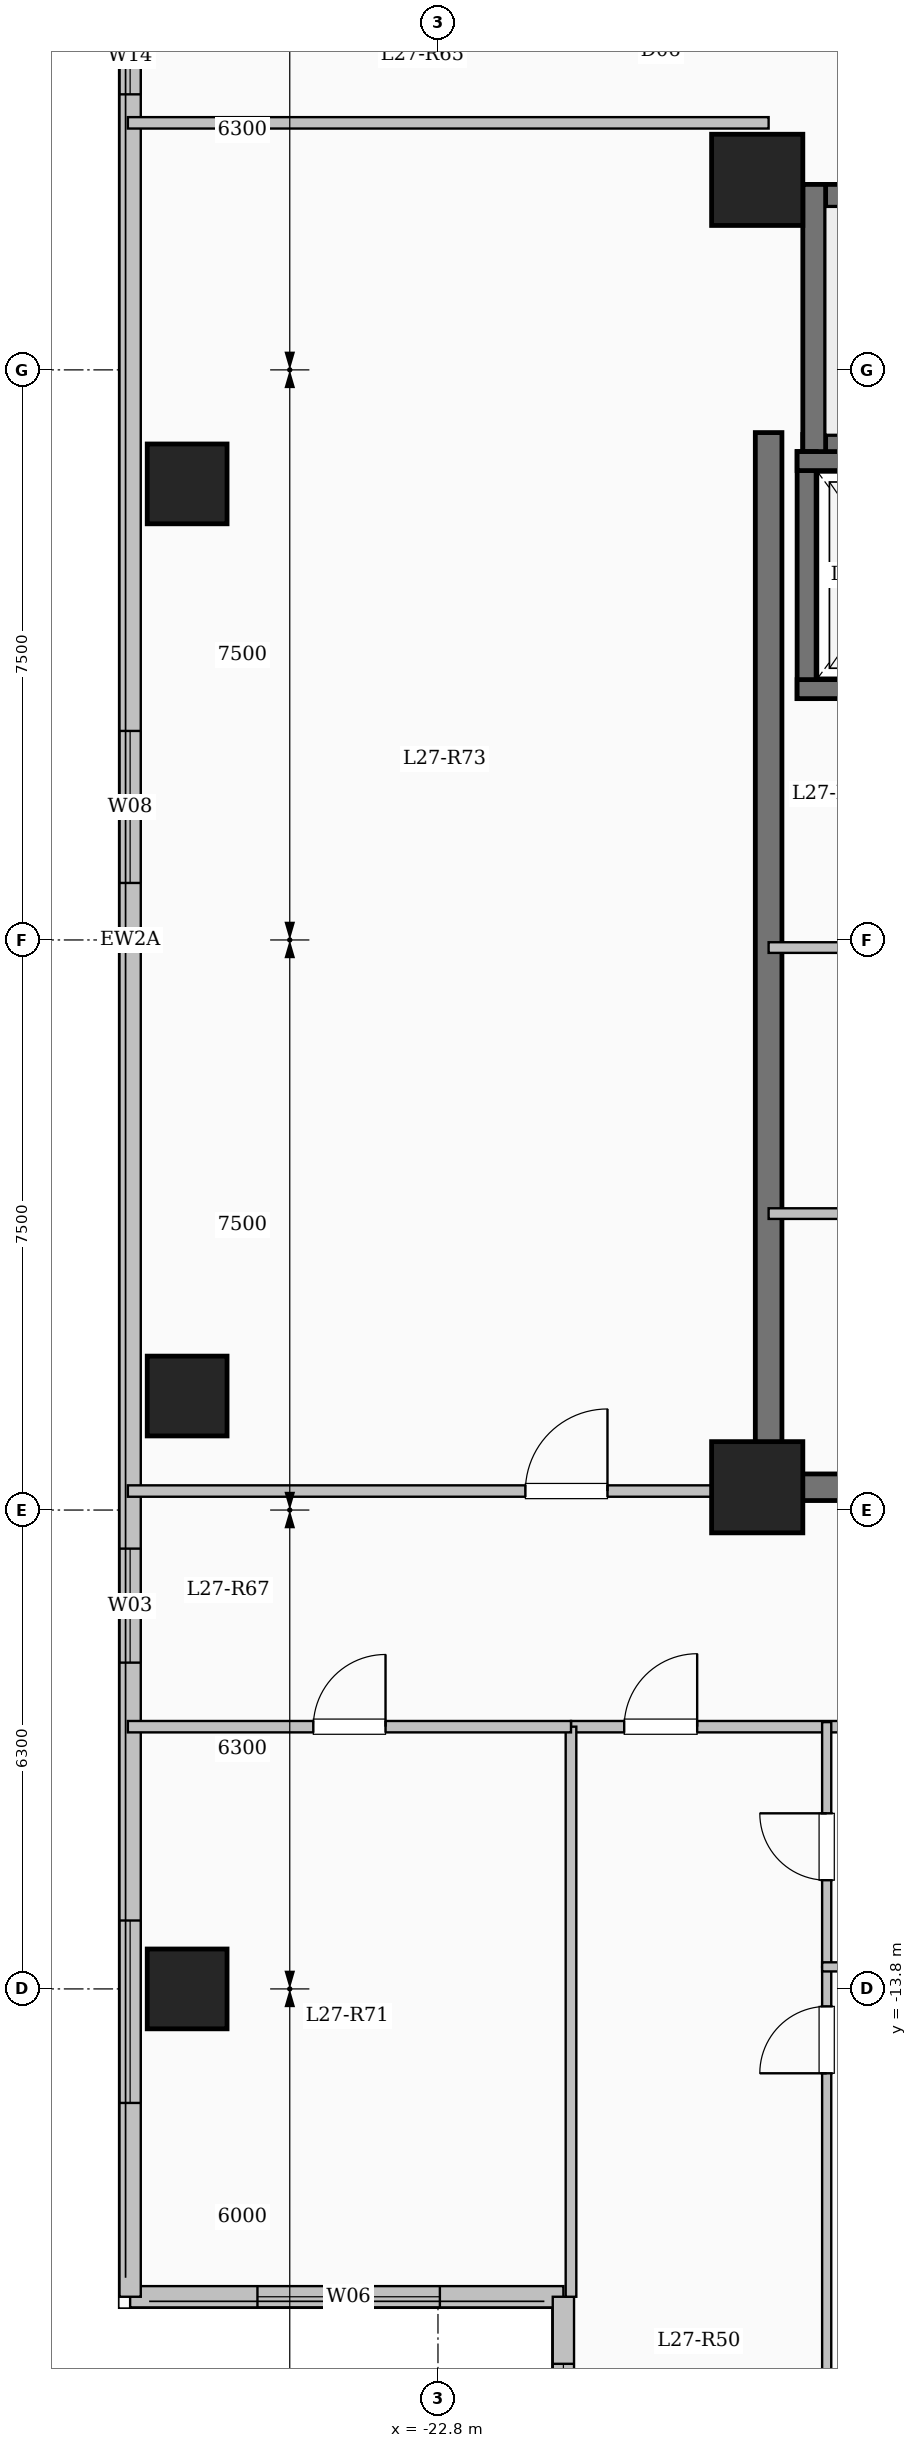
"""IFC4 building model, lengths in metres.
Left out: names, types, materials, properties, quantities, classifications, styles, units other than length and angle.
Written with IfcOpenShell. Run it as: python <this file> out.ifc"""

import sys

from ifc_helpers import new_model, si_unit, direction, frame, frame_2d, origin, origin_2d, place, context, subcontext, project, spatial, rectangle, extrude, element, fill, save


model = new_model("IFC4")
c1 = context("Model", 3, precision=1e-05, world=origin(), true_north=direction((0.0, 1.0)))
c2 = subcontext(c1, "Body", "Model", "MODEL_VIEW")
j1 = project(units=[si_unit("LENGTHUNIT", "METRE"), si_unit("PLANEANGLEUNIT", "RADIAN")], contexts=[c1])
p1 = place(None, origin())
s1 = spatial("IfcSite", under=j1, at=p1, CompositionType="ELEMENT")
p2 = place(p1, origin())
s2 = spatial("IfcBuilding", under=s1, at=p2, CompositionType="ELEMENT")
p3 = place(p2, frame((0.0, 0.0, 101.75)))
s3 = spatial("IfcBuildingStorey", under=s2, at=p3, CompositionType="ELEMENT", Elevation=101.75)
for number, where, z_axis, x_axis in (
    (1, (-18.6, -7.2, 0.0), (0.0, 0.0, 1.0), (1.0, 0.0, 0.0)),
    (2, (-18.6, 10.0, 0.0), (0.0, 0.0, 1.0), (1.0, 0.0, 0.0)),
):
    element("IfcColumn", number, at=place(p3, frame(where, z_axis=z_axis, x_axis=x_axis)), inside=s3, PredefinedType="COLUMN", context=c2, shape_type="SweptSolid", body=[
        extrude(rectangle(XDim=1.2, YDim=1.2, at=origin_2d()), origin(), (0.0, 0.0, 1.0), 3.35),
    ])
for number, where, z_axis, x_axis in (
    (3, (-26.1, -13.8, 0.0), (0.0, 0.0, 1.0), (1.0, 0.0, 0.0)),
    (4, (-26.1, -6.0, 0.0), (0.0, 0.0, 1.0), (1.0, 0.0, 0.0)),
    (5, (-26.1, 6.0, 0.0), (0.0, 0.0, 1.0), (1.0, 0.0, 0.0)),
):
    element("IfcColumn", number, at=place(p3, frame(where, z_axis=z_axis, x_axis=x_axis)), inside=s3, PredefinedType="COLUMN", context=c2, shape_type="SweptSolid", body=[
        extrude(rectangle(XDim=1.05, YDim=1.05, at=origin_2d()), origin(), (0.0, 0.0, 1.0), 3.35),
    ])
p4 = place(p3, frame((-21.15, -17.85, 0.0), z_axis=(0.0, 0.0, 1.0), x_axis=(-1.0, 0.0, 0.0)))
e6 = element("IfcWall", 6, at=p4, inside=s3, PredefinedType="SOLIDWALL", context=c2, shape_type="SweptSolid", body=[
    extrude(rectangle(XDim=5.7, YDim=0.28, at=frame_2d((2.85, 0.0))), origin(), (0.0, 0.0, 1.0), 3.1),
])
p5 = place(p4, frame((1.625, 0.0, 0.9)))
e7 = element("IfcOpeningElement", 7, at=p5, cuts=e6, PredefinedType="OPENING", context=c2, shape_type="SweptSolid", body=[
    extrude(rectangle(XDim=2.4, YDim=1.8, at=frame_2d((1.2, 0.9))), frame((0.0, 0.15, 0.0), z_axis=(0.0, -1.0, 0.0), x_axis=(1.0, 0.0, 0.0)), (0.0, 0.0, 1.0), 0.3),
])
p6 = place(p3, frame((-26.85, -17.85, 0.0), z_axis=(0.0, 0.0, 1.0), x_axis=(0.0, 1.0, 0.0)))
e8 = element("IfcWall", 8, at=p6, inside=s3, PredefinedType="SOLIDWALL", context=c2, shape_type="SweptSolid", body=[
    extrude(rectangle(XDim=35.7, YDim=0.28, at=frame_2d((17.85, 0.0))), origin(), (0.0, 0.0, 1.0), 3.1),
])
p7 = place(p6, frame((2.55, 0.0, 0.9)))
e9 = element("IfcOpeningElement", 9, at=p7, cuts=e8, PredefinedType="OPENING", context=c2, shape_type="SweptSolid", body=[
    extrude(rectangle(XDim=2.4, YDim=1.8, at=frame_2d((1.2, 0.9))), frame((0.0, 0.15, 0.0), z_axis=(0.0, -1.0, 0.0), x_axis=(1.0, 0.0, 0.0)), (0.0, 0.0, 1.0), 0.3),
])
p8 = place(p6, frame((8.343, 0.0, 0.9)))
e10 = element("IfcOpeningElement", 10, at=p8, cuts=e8, PredefinedType="OPENING", context=c2, shape_type="SweptSolid", body=[
    extrude(rectangle(XDim=1.5, YDim=1.65, at=frame_2d((0.75, 0.825))), frame((0.0, 0.15, 0.0), z_axis=(0.0, -1.0, 0.0), x_axis=(1.0, 0.0, 0.0)), (0.0, 0.0, 1.0), 0.3),
])
p9 = place(p6, frame((18.6, 0.0, 0.9)))
e11 = element("IfcOpeningElement", 11, at=p9, cuts=e8, PredefinedType="OPENING", context=c2, shape_type="SweptSolid", body=[
    extrude(rectangle(XDim=2.0, YDim=1.7, at=frame_2d((1.0, 0.85))), frame((0.0, 0.15, 0.0), z_axis=(0.0, -1.0, 0.0), x_axis=(1.0, 0.0, 0.0)), (0.0, 0.0, 1.0), 0.3),
])
p10 = place(p6, frame((28.975, 0.0, 0.95)))
e12 = element("IfcOpeningElement", 12, at=p10, cuts=e8, PredefinedType="OPENING", context=c2, shape_type="SweptSolid", body=[
    extrude(rectangle(XDim=1.0, YDim=1.5, at=frame_2d((0.5, 0.75))), frame((0.0, 0.15, 0.0), z_axis=(0.0, -1.0, 0.0), x_axis=(1.0, 0.0, 0.0)), (0.0, 0.0, 1.0), 0.3),
])
p11 = place(p6, frame((32.025, 0.0, 0.9)))
e13 = element("IfcOpeningElement", 13, at=p11, cuts=e8, PredefinedType="OPENING", context=c2, shape_type="SweptSolid", body=[
    extrude(rectangle(XDim=2.0, YDim=1.7, at=frame_2d((1.0, 0.85))), frame((0.0, 0.15, 0.0), z_axis=(0.0, -1.0, 0.0), x_axis=(1.0, 0.0, 0.0)), (0.0, 0.0, 1.0), 0.3),
])
p12 = place(p3, frame((-21.15, -22.05, 0.0), z_axis=(0.0, 0.0, 1.0), x_axis=(0.0, 1.0, 0.0)))
e14 = element("IfcWall", 14, at=p12, inside=s3, PredefinedType="SOLIDWALL", context=c2, shape_type="SweptSolid", body=[
    extrude(rectangle(XDim=4.2, YDim=0.28, at=frame_2d((2.1, 0.0))), origin(), (0.0, 0.0, 1.0), 3.1),
])
p13 = place(p12, frame((0.918, 0.0, 0.9)))
e15 = element("IfcOpeningElement", 15, at=p13, cuts=e14, PredefinedType="OPENING", context=c2, shape_type="SweptSolid", body=[
    extrude(rectangle(XDim=2.4, YDim=1.8, at=frame_2d((1.2, 0.9))), frame((0.0, 0.15, 0.0), z_axis=(0.0, -1.0, 0.0), x_axis=(1.0, 0.0, 0.0)), (0.0, 0.0, 1.0), 0.3),
])
p14 = place(p3, frame((-18.0, 9.79, 0.0), z_axis=(0.0, 0.0, 1.0), x_axis=(1.0, 0.0, 0.0)))
e16 = element("IfcWall", 16, at=p14, inside=s3, PredefinedType="SHEAR", context=c2, shape_type="SweptSolid", body=[
    extrude(rectangle(XDim=8.0, YDim=0.3, at=frame_2d((4.0, 0.0))), origin(), (0.0, 0.0, 1.0), 3.35),
])
p15 = place(p3, frame((-18.0, 6.5, 0.0), z_axis=(0.0, 0.0, 1.0), x_axis=(1.0, 0.0, 0.0)))
e17 = element("IfcWall", 17, at=p15, inside=s3, PredefinedType="SHEAR", context=c2, shape_type="SweptSolid", body=[
    extrude(rectangle(XDim=8.0, YDim=0.3, at=frame_2d((4.0, 0.0))), origin(), (0.0, 0.0, 1.0), 3.35),
])
p16 = place(p15, frame((6.45, 0.0, 0.0)))
e18 = element("IfcOpeningElement", 18, at=p16, cuts=e17, PredefinedType="OPENING", context=c2, shape_type="SweptSolid", body=[
    extrude(rectangle(XDim=1.0, YDim=2.15, at=frame_2d((0.5, 1.075))), frame((0.0, 0.16, 0.0), z_axis=(0.0, -1.0, 0.0), x_axis=(1.0, 0.0, 0.0)), (0.0, 0.0, 1.0), 0.32),
])
p17 = place(p3, frame((-17.85, 6.35, 0.0), z_axis=(0.0, 0.0, 1.0), x_axis=(0.0, 1.0, 0.0)))
e19 = element("IfcWall", 19, at=p17, inside=s3, PredefinedType="SHEAR", context=c2, shape_type="SweptSolid", body=[
    extrude(rectangle(XDim=3.59, YDim=0.3, at=frame_2d((1.795, 0.0))), origin(), (0.0, 0.0, 1.0), 3.35),
])
p18 = place(p3, frame((-17.95, 3.175, 0.0), z_axis=(0.0, 0.0, 1.0), x_axis=(0.0, 1.0, 0.0)))
e20 = element("IfcWall", 20, at=p18, inside=s3, PredefinedType="SHEAR", context=c2, shape_type="SweptSolid", body=[
    extrude(rectangle(XDim=3.25, YDim=0.25, at=frame_2d((1.625, 0.0))), origin(), (0.0, 0.0, 1.0), 3.35),
])
for number, where, z_axis, x_axis in (
    (21, (-18.075, 3.3, 0.0), (0.0, 0.0, 1.0), (1.0, 0.0, 0.0)),
    (22, (-18.075, 6.3, 0.0), (0.0, 0.0, 1.0), (1.0, 0.0, 0.0)),
):
    element("IfcWall", number, at=place(p3, frame(where, z_axis=z_axis, x_axis=x_axis)), inside=s3, PredefinedType="SHEAR", context=c2, shape_type="SweptSolid", body=[
        extrude(rectangle(XDim=2.55, YDim=0.25, at=frame_2d((1.275, 0.0))), origin(), (0.0, 0.0, 1.0), 3.35),
    ])
p19 = place(p3, frame((-18.45, -7.375, 0.0), z_axis=(0.0, 0.0, 1.0), x_axis=(0.0, 1.0, 0.0)))
e23 = element("IfcWall", 23, at=p19, inside=s3, PredefinedType="SHEAR", context=c2, shape_type="SweptSolid", body=[
    extrude(rectangle(XDim=14.05, YDim=0.35, at=frame_2d((7.025, 0.0))), origin(), (0.0, 0.0, 1.0), 3.35),
])
p20 = place(p3, frame((-18.625, -7.2, 0.0), z_axis=(0.0, 0.0, 1.0), x_axis=(1.0, 0.0, 0.0)))
e24 = element("IfcWall", 24, at=p20, inside=s3, PredefinedType="SHEAR", context=c2, shape_type="SweptSolid", body=[
    extrude(rectangle(XDim=8.55, YDim=0.35, at=frame_2d((4.275, 0.0))), origin(), (0.0, 0.0, 1.0), 3.35),
])
p21 = place(p3, frame((-18.45, -3.6, 0.0), z_axis=(0.0, 0.0, 1.0), x_axis=(1.0, 0.0, 0.0)))
e25 = element("IfcWall", 25, at=p21, inside=s3, PredefinedType="PARTITIONING", context=c2, shape_type="SweptSolid", body=[
    extrude(rectangle(XDim=3.05, YDim=0.14, at=frame_2d((1.525, 0.0))), origin(), (0.0, 0.0, 1.0), 3.1),
])
p22 = place(p21, frame((1.05, 0.0, 0.0)))
e26 = element("IfcOpeningElement", 26, at=p22, cuts=e25, PredefinedType="OPENING", context=c2, shape_type="SweptSolid", body=[
    extrude(rectangle(XDim=0.9, YDim=2.08, at=frame_2d((0.45, 1.04))), frame((0.0, 0.08, 0.0), z_axis=(0.0, -1.0, 0.0), x_axis=(1.0, 0.0, 0.0)), (0.0, 0.0, 1.0), 0.16),
])
p23 = place(p3, frame((-18.45, -0.1, 0.0), z_axis=(0.0, 0.0, 1.0), x_axis=(1.0, 0.0, 0.0)))
e27 = element("IfcWall", 27, at=p23, inside=s3, PredefinedType="PARTITIONING", context=c2, shape_type="SweptSolid", body=[
    extrude(rectangle(XDim=3.05, YDim=0.14, at=frame_2d((1.525, 0.0))), origin(), (0.0, 0.0, 1.0), 3.1),
])
p24 = place(p23, frame((1.05, 0.0, 0.0)))
e28 = element("IfcOpeningElement", 28, at=p24, cuts=e27, PredefinedType="OPENING", context=c2, shape_type="SweptSolid", body=[
    extrude(rectangle(XDim=0.9, YDim=2.08, at=frame_2d((0.45, 1.04))), frame((0.0, 0.08, 0.0), z_axis=(0.0, -1.0, 0.0), x_axis=(1.0, 0.0, 0.0)), (0.0, 0.0, 1.0), 0.16),
])
p25 = place(p3, frame((-21.05, -10.35, 0.0), z_axis=(0.0, 0.0, 1.0), x_axis=(1.0, 0.0, 0.0)))
e29 = element("IfcWall", 29, at=p25, inside=s3, PredefinedType="PARTITIONING", context=c2, shape_type="SweptSolid", body=[
    extrude(rectangle(XDim=12.5, YDim=0.15, at=frame_2d((6.25, 0.0))), origin(), (0.0, 0.0, 1.0), 3.1),
])
p26 = place(p25, frame((0.7, 0.0, 0.0)))
e30 = element("IfcOpeningElement", 30, at=p26, cuts=e29, PredefinedType="OPENING", context=c2, shape_type="SweptSolid", body=[
    extrude(rectangle(XDim=0.96, YDim=2.15, at=frame_2d((0.48, 1.075))), frame((0.0, 0.085, 0.0), z_axis=(0.0, -1.0, 0.0), x_axis=(1.0, 0.0, 0.0)), (0.0, 0.0, 1.0), 0.17),
])
p27 = place(p25, frame((7.174, 0.0, 0.0)))
e31 = element("IfcOpeningElement", 31, at=p27, cuts=e29, PredefinedType="OPENING", context=c2, shape_type="SweptSolid", body=[
    extrude(rectangle(XDim=0.96, YDim=2.15, at=frame_2d((0.48, 1.075))), frame((0.0, 0.085, 0.0), z_axis=(0.0, -1.0, 0.0), x_axis=(1.0, 0.0, 0.0)), (0.0, 0.0, 1.0), 0.17),
])
p28 = place(p3, frame((-17.686, -22.1, 0.0), z_axis=(0.0, 0.0, 1.0), x_axis=(0.0, 1.0, 0.0)))
e32 = element("IfcWall", 32, at=p28, inside=s3, PredefinedType="PARTITIONING", context=c2, shape_type="SweptSolid", body=[
    extrude(rectangle(XDim=8.59, YDim=0.12, at=frame_2d((4.295, 0.0))), origin(), (0.0, 0.0, 1.0), 3.1),
])
p29 = place(p28, frame((7.19, 0.0, 0.0)))
e33 = element("IfcOpeningElement", 33, at=p29, cuts=e32, PredefinedType="OPENING", context=c2, shape_type="SweptSolid", body=[
    extrude(rectangle(XDim=0.88, YDim=2.1, at=frame_2d((0.44, 1.05))), frame((0.0, 0.07, 0.0), z_axis=(0.0, -1.0, 0.0), x_axis=(1.0, 0.0, 0.0)), (0.0, 0.0, 1.0), 0.14),
])
p30 = place(p3, frame((-17.686, -13.51, 0.0), z_axis=(0.0, 0.0, 1.0), x_axis=(0.0, 1.0, 0.0)))
e34 = element("IfcWall", 34, at=p30, inside=s3, PredefinedType="PARTITIONING", context=c2, shape_type="SweptSolid", body=[
    extrude(rectangle(XDim=3.22, YDim=0.12, at=frame_2d((1.61, 0.0))), origin(), (0.0, 0.0, 1.0), 3.1),
])
p31 = place(p30, frame((1.14, 0.0, 0.0)))
e35 = element("IfcOpeningElement", 35, at=p31, cuts=e34, PredefinedType="OPENING", context=c2, shape_type="SweptSolid", body=[
    extrude(rectangle(XDim=0.88, YDim=2.1, at=frame_2d((0.44, 1.05))), frame((0.0, 0.07, 0.0), z_axis=(0.0, -1.0, 0.0), x_axis=(1.0, 0.0, 0.0)), (0.0, 0.0, 1.0), 0.14),
])
p32 = place(p3, frame((-17.746, -13.51, 0.0), z_axis=(0.0, 0.0, 1.0), x_axis=(1.0, 0.0, 0.0)))
e36 = element("IfcWall", 36, at=p32, inside=s3, PredefinedType="PARTITIONING", context=c2, shape_type="SweptSolid", body=[
    extrude(rectangle(XDim=3.23, YDim=0.12, at=frame_2d((1.615, 0.0))), origin(), (0.0, 0.0, 1.0), 3.1),
])
p33 = place(p3, frame((-26.88, -7.25, 0.0), z_axis=(0.0, 0.0, 1.0), x_axis=(1.0, 0.0, 0.0)))
e37 = element("IfcWall", 37, at=p33, inside=s3, PredefinedType="PARTITIONING", context=c2, shape_type="SweptSolid", body=[
    extrude(rectangle(XDim=8.43, YDim=0.15, at=frame_2d((4.215, 0.0))), origin(), (0.0, 0.0, 1.0), 3.1),
])
p34 = place(p33, frame((5.23, 0.0, 0.0)))
e38 = element("IfcOpeningElement", 38, at=p34, cuts=e37, PredefinedType="OPENING", context=c2, shape_type="SweptSolid", body=[
    extrude(rectangle(XDim=1.08, YDim=2.15, at=frame_2d((0.54, 1.075))), frame((0.0, 0.085, 0.0), z_axis=(0.0, -1.0, 0.0), x_axis=(1.0, 0.0, 0.0)), (0.0, 0.0, 1.0), 0.17),
])
p35 = place(p3, frame((-26.88, 10.75, 0.0), z_axis=(0.0, 0.0, 1.0), x_axis=(1.0, 0.0, 0.0)))
e39 = element("IfcWall", 39, at=p35, inside=s3, PredefinedType="PARTITIONING", context=c2, shape_type="SweptSolid", body=[
    extrude(rectangle(XDim=8.43, YDim=0.15, at=frame_2d((4.215, 0.0))), origin(), (0.0, 0.0, 1.0), 3.1),
])
p36 = place(p3, frame((-21.05, -17.85, 0.0), z_axis=(0.0, 0.0, 1.0), x_axis=(0.0, 1.0, 0.0)))
e40 = element("IfcWall", 40, at=p36, inside=s3, PredefinedType="PARTITIONING", context=c2, shape_type="SweptSolid", body=[
    extrude(rectangle(XDim=7.5, YDim=0.14, at=frame_2d((3.75, 0.0))), origin(), (0.0, 0.0, 1.0), 3.1),
])
p37 = place(p3, frame((-26.88, -10.35, 0.0), z_axis=(0.0, 0.0, 1.0), x_axis=(1.0, 0.0, 0.0)))
e41 = element("IfcWall", 41, at=p37, inside=s3, PredefinedType="PARTITIONING", context=c2, shape_type="SweptSolid", body=[
    extrude(rectangle(XDim=5.83, YDim=0.15, at=frame_2d((2.915, 0.0))), origin(), (0.0, 0.0, 1.0), 3.1),
])
p38 = place(p37, frame((2.44, 0.0, 0.0)))
e42 = element("IfcOpeningElement", 42, at=p38, cuts=e41, PredefinedType="OPENING", context=c2, shape_type="SweptSolid", body=[
    extrude(rectangle(XDim=0.95, YDim=2.15, at=frame_2d((0.475, 1.075))), frame((0.0, 0.085, 0.0), z_axis=(0.0, -1.0, 0.0), x_axis=(1.0, 0.0, 0.0)), (0.0, 0.0, 1.0), 0.17),
])
p39 = place(p5, origin())
e43 = element("IfcWindow", 43, at=p39, inside=s3, PartitioningType="SINGLE_PANEL", PredefinedType="WINDOW", context=c2, shape_type="SweptSolid", body=[
    extrude(rectangle(XDim=2.4, YDim=1.8, at=frame_2d((1.2, 0.9))), frame((0.0, 0.03, 0.0), z_axis=(0.0, -1.0, 0.0), x_axis=(1.0, 0.0, 0.0)), (0.0, 0.0, 1.0), 0.06),
])
fill(e7, e43)
p40 = place(p7, origin())
e44 = element("IfcWindow", 44, at=p40, inside=s3, PartitioningType="SINGLE_PANEL", PredefinedType="WINDOW", context=c2, shape_type="SweptSolid", body=[
    extrude(rectangle(XDim=2.4, YDim=1.8, at=frame_2d((1.2, 0.9))), frame((0.0, 0.03, 0.0), z_axis=(0.0, -1.0, 0.0), x_axis=(1.0, 0.0, 0.0)), (0.0, 0.0, 1.0), 0.06),
])
fill(e9, e44)
p41 = place(p8, origin())
e45 = element("IfcWindow", 45, at=p41, inside=s3, PartitioningType="SINGLE_PANEL", PredefinedType="WINDOW", context=c2, shape_type="SweptSolid", body=[
    extrude(rectangle(XDim=1.5, YDim=1.65, at=frame_2d((0.75, 0.825))), frame((0.0, 0.03, 0.0), z_axis=(0.0, -1.0, 0.0), x_axis=(1.0, 0.0, 0.0)), (0.0, 0.0, 1.0), 0.06),
])
fill(e10, e45)
p42 = place(p9, origin())
e46 = element("IfcWindow", 46, at=p42, inside=s3, PartitioningType="SINGLE_PANEL", PredefinedType="WINDOW", context=c2, shape_type="SweptSolid", body=[
    extrude(rectangle(XDim=2.0, YDim=1.7, at=frame_2d((1.0, 0.85))), frame((0.0, 0.03, 0.0), z_axis=(0.0, -1.0, 0.0), x_axis=(1.0, 0.0, 0.0)), (0.0, 0.0, 1.0), 0.06),
])
fill(e11, e46)
p43 = place(p10, origin())
e47 = element("IfcWindow", 47, at=p43, inside=s3, PartitioningType="SINGLE_PANEL", PredefinedType="WINDOW", context=c2, shape_type="SweptSolid", body=[
    extrude(rectangle(XDim=1.0, YDim=1.5, at=frame_2d((0.5, 0.75))), frame((0.0, 0.03, 0.0), z_axis=(0.0, -1.0, 0.0), x_axis=(1.0, 0.0, 0.0)), (0.0, 0.0, 1.0), 0.06),
])
fill(e12, e47)
p44 = place(p13, origin())
e48 = element("IfcWindow", 48, at=p44, inside=s3, PartitioningType="SINGLE_PANEL", PredefinedType="WINDOW", context=c2, shape_type="SweptSolid", body=[
    extrude(rectangle(XDim=2.4, YDim=1.8, at=frame_2d((1.2, 0.9))), frame((0.0, 0.03, 0.0), z_axis=(0.0, -1.0, 0.0), x_axis=(1.0, 0.0, 0.0)), (0.0, 0.0, 1.0), 0.06),
])
fill(e15, e48)
p45 = place(p26, origin())
e49 = element("IfcDoor", 49, at=p45, inside=s3, OperationType="SINGLE_SWING_RIGHT", PredefinedType="DOOR", context=c2, shape_type="SweptSolid", body=[
    extrude(rectangle(XDim=0.96, YDim=2.15, at=frame_2d((0.48, 1.075))), frame((0.0, 0.025, 0.0), z_axis=(0.0, -1.0, 0.0), x_axis=(1.0, 0.0, 0.0)), (0.0, 0.0, 1.0), 0.05),
])
fill(e30, e49)
p46 = place(p29, origin())
e50 = element("IfcDoor", 50, at=p46, inside=s3, OperationType="SINGLE_SWING_LEFT", PredefinedType="DOOR", context=c2, shape_type="SweptSolid", body=[
    extrude(rectangle(XDim=0.88, YDim=2.1, at=frame_2d((0.44, 1.05))), frame((0.0, 0.025, 0.0), z_axis=(0.0, -1.0, 0.0), x_axis=(1.0, 0.0, 0.0)), (0.0, 0.0, 1.0), 0.05),
])
fill(e33, e50)
p47 = place(p31, origin())
e51 = element("IfcDoor", 51, at=p47, inside=s3, OperationType="SINGLE_SWING_RIGHT", PredefinedType="DOOR", context=c2, shape_type="SweptSolid", body=[
    extrude(rectangle(XDim=0.88, YDim=2.1, at=frame_2d((0.44, 1.05))), frame((0.0, 0.025, 0.0), z_axis=(0.0, -1.0, 0.0), x_axis=(1.0, 0.0, 0.0)), (0.0, 0.0, 1.0), 0.05),
])
fill(e35, e51)
p48 = place(p38, origin())
e52 = element("IfcDoor", 52, at=p48, inside=s3, OperationType="SINGLE_SWING_RIGHT", PredefinedType="DOOR", context=c2, shape_type="SweptSolid", body=[
    extrude(rectangle(XDim=0.95, YDim=2.15, at=frame_2d((0.475, 1.075))), frame((0.0, 0.025, 0.0), z_axis=(0.0, -1.0, 0.0), x_axis=(1.0, 0.0, 0.0)), (0.0, 0.0, 1.0), 0.05),
])
fill(e42, e52)
p49 = place(p34, origin())
e53 = element("IfcDoor", 53, at=p49, inside=s3, OperationType="SINGLE_SWING_RIGHT", PredefinedType="DOOR", context=c2, shape_type="SweptSolid", body=[
    extrude(rectangle(XDim=1.08, YDim=2.15, at=frame_2d((0.54, 1.075))), frame((0.0, 0.025, 0.0), z_axis=(0.0, -1.0, 0.0), x_axis=(1.0, 0.0, 0.0)), (0.0, 0.0, 1.0), 0.05),
])
fill(e38, e53)
save(model, sys.argv[1])
